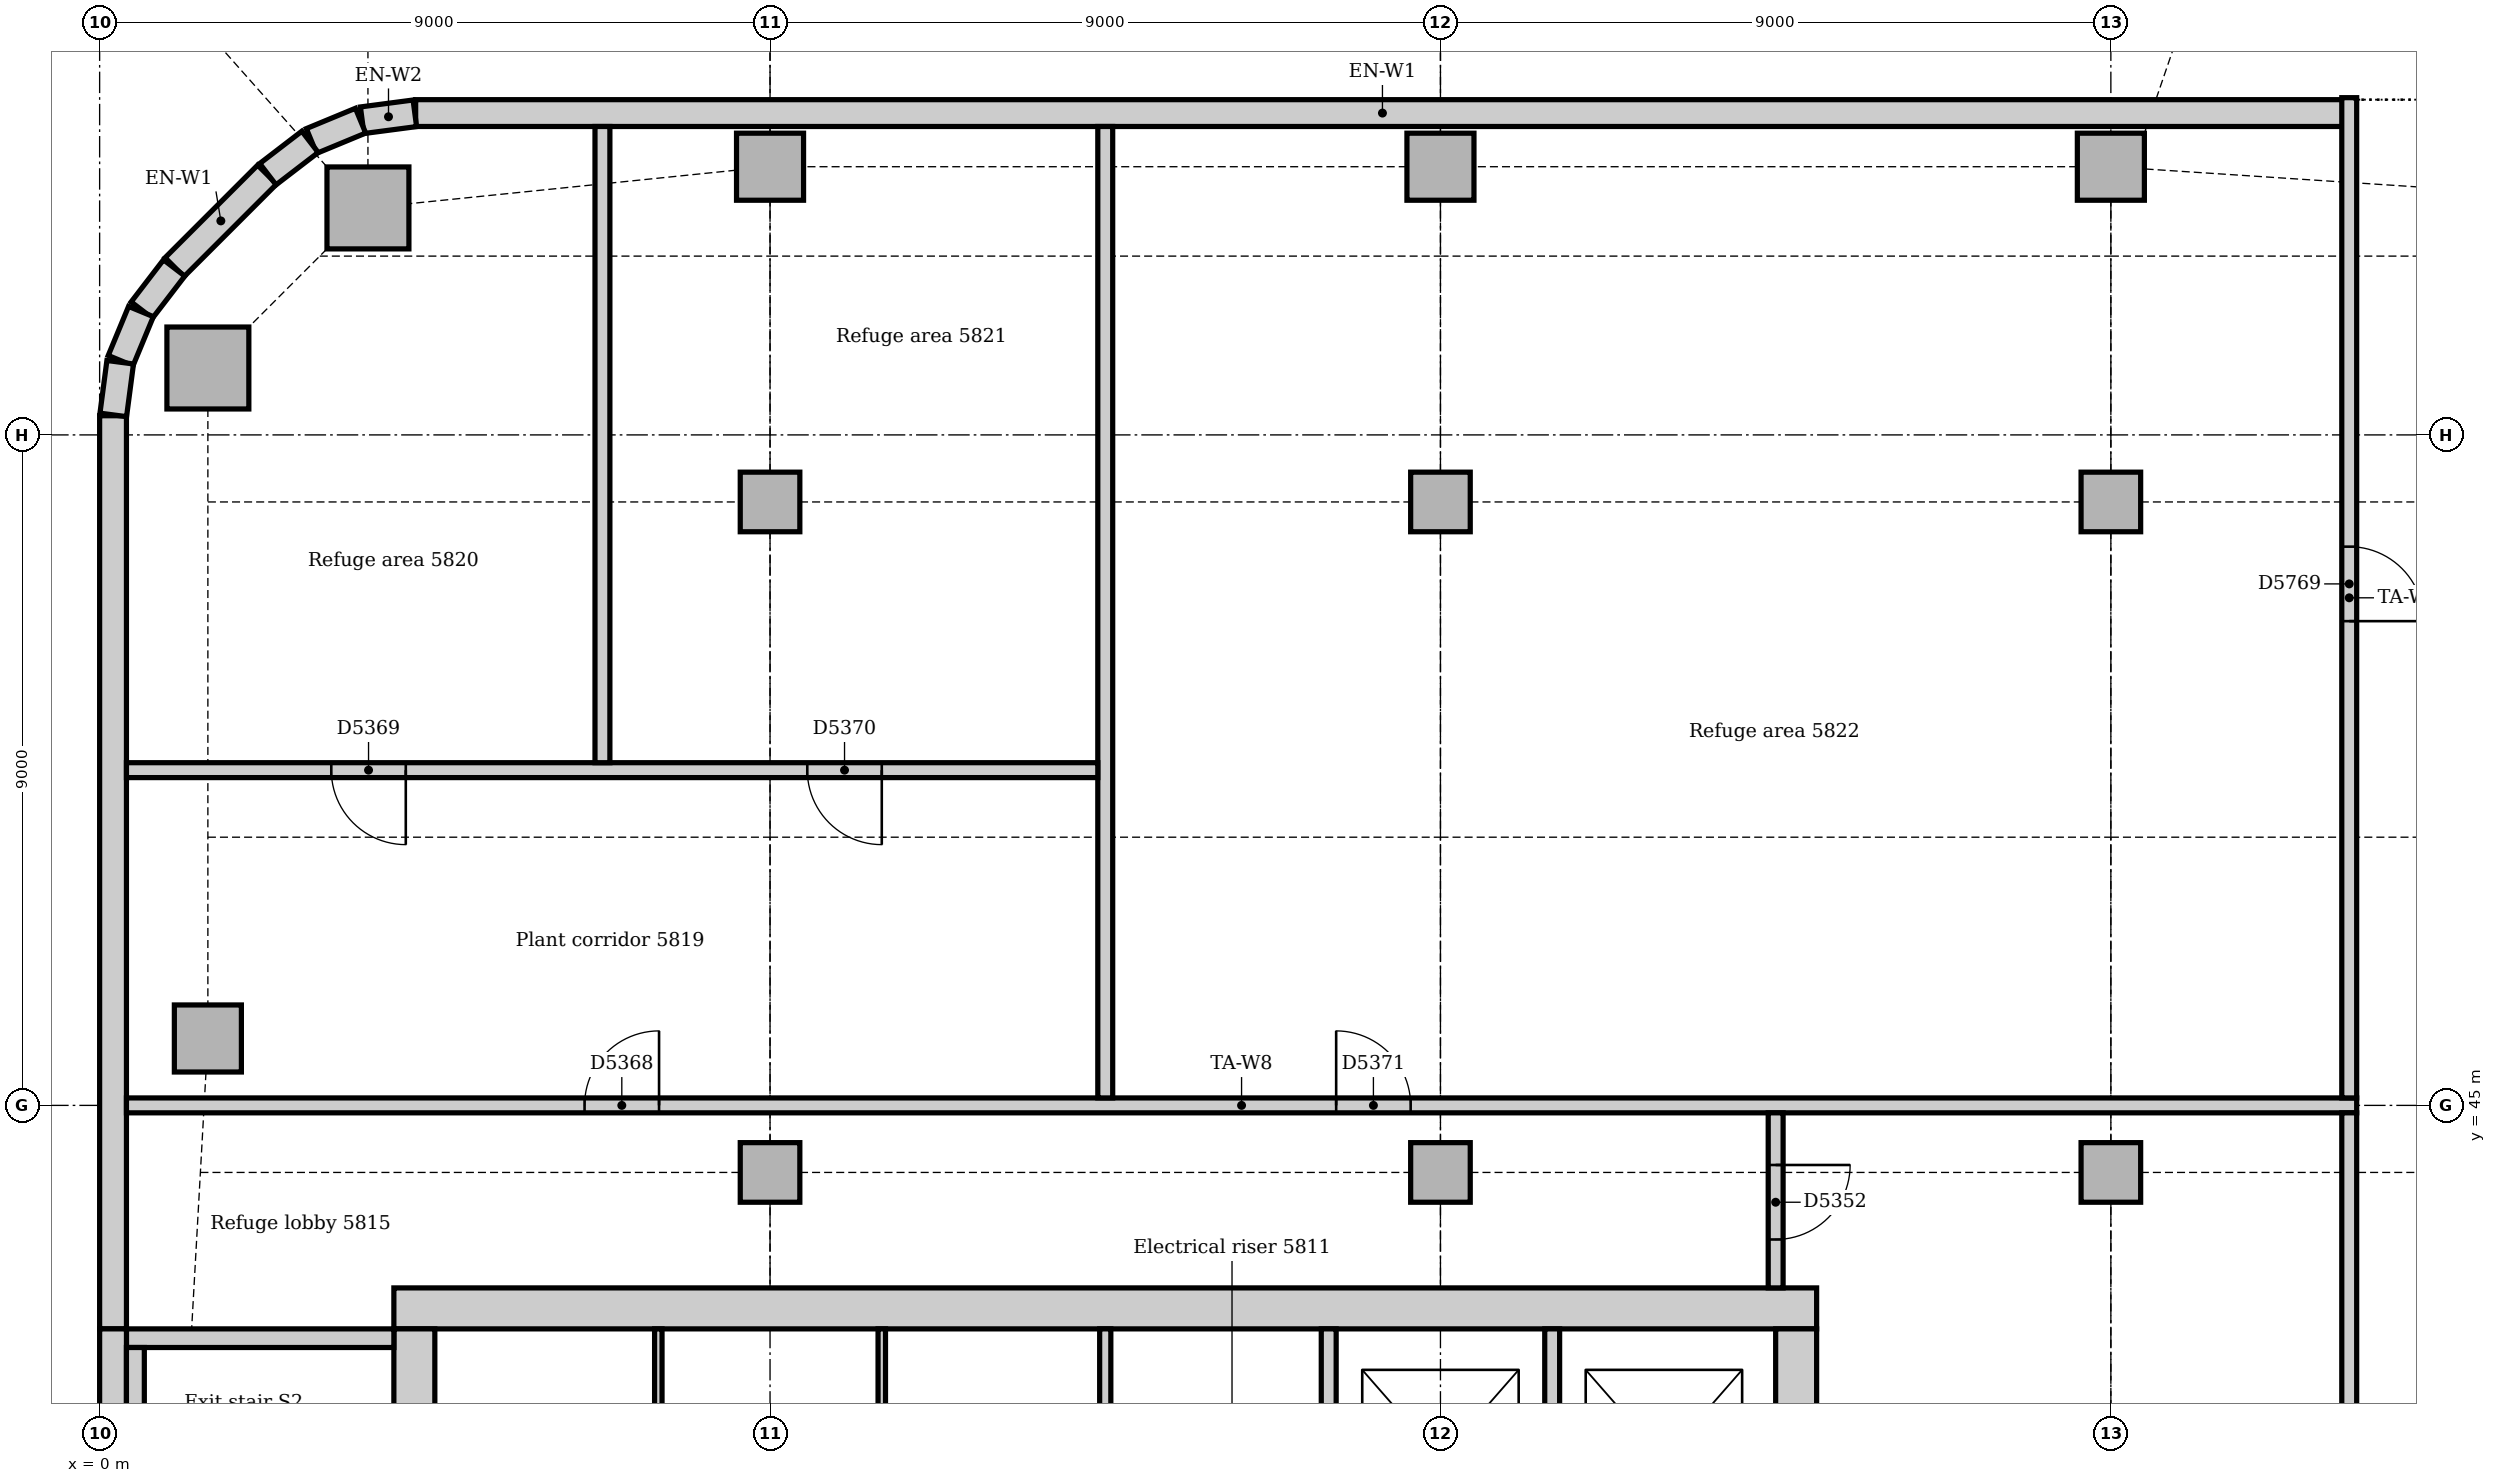
"""IFC4 building model, lengths in metres.
Left out: names, types, materials, properties, quantities, classifications, styles, units other than length and angle.
Written with IfcOpenShell. Run it as: python <this file> out.ifc"""

import sys

from ifc_helpers import new_model, si_unit, direction, frame, frame_2d, origin, origin_2d, place, context, subcontext, project, spatial, rectangle, extrude, element, fill, save


model = new_model("IFC4")
c1 = context("Model", 3, precision=1e-05, world=origin(), true_north=direction((0.0, 1.0)))
c2 = subcontext(c1, "Body", "Model", "MODEL_VIEW")
j1 = project(units=[si_unit("LENGTHUNIT", "METRE"), si_unit("PLANEANGLEUNIT", "RADIAN")], contexts=[c1])
p1 = place(None, origin())
s1 = spatial("IfcSite", under=j1, at=p1, CompositionType="ELEMENT")
p2 = place(p1, origin())
s2 = spatial("IfcBuilding", under=s1, at=p2, CompositionType="ELEMENT")
p3 = place(p2, frame((0.0, 0.0, 242.0)))
s3 = spatial("IfcBuildingStorey", under=s2, at=p3, CompositionType="ELEMENT", Elevation=242.0)
p4 = place(p3, frame((23.05, 42.275, 0.0), z_axis=(0.0, 0.0, 1.0), x_axis=(-1.0, 0.0, 0.0)))
e1 = element("IfcWall", 1, at=p4, inside=s3, PredefinedType="SOLIDWALL", context=c2, shape_type="SweptSolid", body=[
    extrude(rectangle(XDim=19.1, YDim=0.55, at=frame_2d((9.55, 0.0))), origin(), (0.0, 0.0, 1.0), 5.0),
])
p5 = place(p3, frame((22.775, 31.5, 0.0), z_axis=(0.0, 0.0, 1.0), x_axis=(0.0, 1.0, 0.0)))
e2 = element("IfcWall", 2, at=p5, inside=s3, PredefinedType="SOLIDWALL", context=c2, shape_type="SweptSolid", body=[
    extrude(rectangle(XDim=10.5, YDim=0.55, at=frame_2d((5.25, 0.0))), origin(), (0.0, 0.0, 1.0), 5.0),
])
p6 = place(p5, frame((3.15, 0.0, 0.0)))
e3 = element("IfcOpeningElement", 3, at=p6, cuts=e2, PredefinedType="OPENING", context=c2, shape_type="SweptSolid", body=[
    extrude(rectangle(XDim=1.0, YDim=2.1, at=frame_2d((0.5, 1.05))), frame((0.0, 0.285, 0.0), z_axis=(0.0, -1.0, 0.0), x_axis=(1.0, 0.0, 0.0)), (0.0, 0.0, 1.0), 0.57),
])
p7 = place(p5, frame((5.2, 0.0, 0.0)))
e4 = element("IfcOpeningElement", 4, at=p7, cuts=e2, PredefinedType="OPENING", context=c2, shape_type="SweptSolid", body=[
    extrude(rectangle(XDim=1.0, YDim=2.1, at=frame_2d((0.5, 1.05))), frame((0.0, 0.285, 0.0), z_axis=(0.0, -1.0, 0.0), x_axis=(1.0, 0.0, 0.0)), (0.0, 0.0, 1.0), 0.57),
])
p8 = place(p3, frame((4.225, 42.0, 0.0), z_axis=(0.0, 0.0, 1.0), x_axis=(0.0, -1.0, 0.0)))
e5 = element("IfcWall", 5, at=p8, inside=s3, PredefinedType="SOLIDWALL", context=c2, shape_type="SweptSolid", body=[
    extrude(rectangle(XDim=10.5, YDim=0.55, at=frame_2d((5.25, 0.0))), origin(), (0.0, 0.0, 1.0), 5.0),
])
p9 = place(p8, frame((5.3, 0.0, 0.0)))
e6 = element("IfcOpeningElement", 6, at=p9, cuts=e5, PredefinedType="OPENING", context=c2, shape_type="SweptSolid", body=[
    extrude(rectangle(XDim=1.0, YDim=2.1, at=frame_2d((0.5, 1.05))), frame((0.0, 0.285, 0.0), z_axis=(0.0, -1.0, 0.0), x_axis=(1.0, 0.0, 0.0)), (0.0, 0.0, 1.0), 0.57),
])
p10 = place(p3, frame((3.95, 41.875, 0.0), z_axis=(0.0, 0.0, 1.0), x_axis=(-1.0, 0.0, 0.0)))
e7 = element("IfcWall", 7, at=p10, inside=s3, PredefinedType="SOLIDWALL", context=c2, shape_type="SweptSolid", body=[
    extrude(rectangle(XDim=3.59, YDim=0.25, at=frame_2d((1.795, 0.0))), origin(), (0.0, 0.0, 1.0), 5.0),
])
for number, where, z_axis, x_axis in (
    (8, (3.602, 57.047, 0.0), (0.0, 0.0, 1.0), (1.0, 0.0, 0.0)),
    (9, (1.453, 54.898, 0.0), (0.0, 0.0, 1.0), (1.0, 0.0, 0.0)),
):
    element("IfcColumn", number, at=place(p3, frame(where, z_axis=z_axis, x_axis=x_axis)), inside=s3, PredefinedType="COLUMN", context=c2, shape_type="SweptSolid", body=[
        extrude(rectangle(XDim=1.1, YDim=1.1, at=origin_2d()), origin(), (0.0, 0.0, 1.0), 4.85),
    ])
for number, where, z_axis, x_axis in (
    (10, (9.0, 57.6, 0.0), (0.0, 0.0, 1.0), (1.0, 0.0, 0.0)),
    (11, (18.0, 57.6, 0.0), (0.0, 0.0, 1.0), (1.0, 0.0, 0.0)),
    (12, (27.0, 57.6, 0.0), (0.0, 0.0, 1.0), (1.0, 0.0, 0.0)),
    (13, (1.453, 45.898, 0.0), (0.0, 0.0, 1.0), (1.0, 0.0, 0.0)),
):
    element("IfcColumn", number, at=place(p3, frame(where, z_axis=z_axis, x_axis=x_axis)), inside=s3, PredefinedType="COLUMN", context=c2, shape_type="SweptSolid", body=[
        extrude(rectangle(XDim=0.9, YDim=0.9, at=origin_2d()), origin(), (0.0, 0.0, 1.0), 4.85),
    ])
for number, where, z_axis, x_axis in (
    (14, (9.0, 44.1, 0.0), (0.0, 0.0, 1.0), (1.0, 0.0, 0.0)),
    (15, (9.0, 53.1, 0.0), (0.0, 0.0, 1.0), (1.0, 0.0, 0.0)),
    (16, (18.0, 44.1, 0.0), (0.0, 0.0, 1.0), (1.0, 0.0, 0.0)),
    (17, (18.0, 53.1, 0.0), (0.0, 0.0, 1.0), (1.0, 0.0, 0.0)),
    (18, (27.0, 44.1, 0.0), (0.0, 0.0, 1.0), (1.0, 0.0, 0.0)),
    (19, (27.0, 53.1, 0.0), (0.0, 0.0, 1.0), (1.0, 0.0, 0.0)),
):
    element("IfcColumn", number, at=place(p3, frame(where, z_axis=z_axis, x_axis=x_axis)), inside=s3, PredefinedType="COLUMN", context=c2, shape_type="SweptSolid", body=[
        extrude(rectangle(XDim=0.8, YDim=0.8, at=origin_2d()), origin(), (0.0, 0.0, 1.0), 4.85),
    ])
p11 = place(p3, frame((30.2, 58.32, 0.0), z_axis=(0.0, 0.0, 1.0), x_axis=(-1.0, 0.0, 0.0)))
e20 = element("IfcWall", 20, at=p11, inside=s3, PredefinedType="STANDARD", context=c2, shape_type="SweptSolid", body=[
    extrude(rectangle(XDim=25.957, YDim=0.36, at=frame_2d((12.979, 0.0))), origin(), (0.0, 0.0, 1.0), 3.25),
])
p12 = place(p3, frame((2.249, 57.494, 0.0), z_axis=(0.0, 0.0, 1.0), x_axis=(-0.707106781187, -0.707106781187, 0.0)))
e21 = element("IfcWall", 21, at=p12, inside=s3, PredefinedType="STANDARD", context=c2, shape_type="SweptSolid", body=[
    extrude(rectangle(XDim=1.757, YDim=0.36, at=frame_2d((0.879, 0.0))), origin(), (0.0, 0.0, 1.0), 3.25),
])
p13 = place(p3, frame((0.18, 54.257, 0.0), z_axis=(0.0, 0.0, 1.0), x_axis=(0.0, -1.0, 0.0)))
e22 = element("IfcWall", 22, at=p13, inside=s3, PredefinedType="STANDARD", context=c2, shape_type="SweptSolid", body=[
    extrude(rectangle(XDim=12.257, YDim=0.36, at=frame_2d((6.129, 0.0))), origin(), (0.0, 0.0, 1.0), 4.85),
])
p14 = place(p3, frame((0.18, 42.0, 0.0), z_axis=(0.0, 0.0, 1.0), x_axis=(0.0, -1.0, 0.0)))
e23 = element("IfcWall", 23, at=p14, inside=s3, PredefinedType="STANDARD", context=c2, shape_type="SweptSolid", body=[
    extrude(rectangle(XDim=6.75, YDim=0.36, at=frame_2d((3.375, 0.0))), origin(), (0.0, 0.0, 1.0), 4.85),
])
for number, where, z_axis, x_axis in (
    (24, (4.231, 58.317, 0.0), (0.0, 0.0, 1.0), (-0.991, -0.131, 0.0)),
    (25, (3.503, 58.218, 0.0), (0.0, 0.0, 1.0), (-0.924, -0.383, 0.0)),
):
    element("IfcWall", number, at=place(p3, frame(where, z_axis=z_axis, x_axis=x_axis)), inside=s3, PredefinedType="STANDARD", context=c2, shape_type="SweptSolid", body=[
        extrude(rectangle(XDim=0.713, YDim=0.36, at=frame_2d((0.356, 0.0))), origin(), (0.0, 0.0, 1.0), 3.25),
    ])
for number, where, z_axis, x_axis in (
    (26, (2.825, 57.934, 0.0), (0.0, 0.0, 1.0), (-0.793, -0.609, 0.0)),
    (27, (1.0, 56.241, 0.0), (0.0, 0.0, 1.0), (-0.609, -0.793, 0.0)),
):
    element("IfcWall", number, at=place(p3, frame(where, z_axis=z_axis, x_axis=x_axis)), inside=s3, PredefinedType="STANDARD", context=c2, shape_type="SweptSolid", body=[
        extrude(rectangle(XDim=0.713, YDim=0.36, at=frame_2d((0.357, 0.0))), origin(), (0.0, 0.0, 1.0), 3.25),
    ])
for number, where, z_axis, x_axis in (
    (28, (0.555, 55.656, 0.0), (0.0, 0.0, 1.0), (-0.383, -0.924, 0.0)),
    (29, (0.276, 54.976, 0.0), (0.0, 0.0, 1.0), (-0.131, -0.991, 0.0)),
):
    element("IfcWall", number, at=place(p3, frame(where, z_axis=z_axis, x_axis=x_axis)), inside=s3, PredefinedType="STANDARD", context=c2, shape_type="SweptSolid", body=[
        extrude(rectangle(XDim=0.713, YDim=0.36, at=frame_2d((0.356, 0.0))), origin(), (0.0, 0.0, 1.0), 3.25),
    ])
p15 = place(p3, frame((0.48, 39.795, 0.0), z_axis=(0.0, 0.0, 1.0), x_axis=(0.0, 1.0, 0.0)))
e30 = element("IfcWall", 30, at=p15, inside=s3, PredefinedType="STANDARD", context=c2, shape_type="SweptSolid", body=[
    extrude(rectangle(XDim=1.955, YDim=0.24, at=frame_2d((0.978, 0.0))), origin(), (0.0, 0.0, 1.0), 5.0),
])
p16 = place(p3, frame((0.36, 45.0, 0.0), z_axis=(0.0, 0.0, 1.0), x_axis=(1.0, 0.0, 0.0)))
e31 = element("IfcWall", 31, at=p16, inside=s3, PredefinedType="PARTITIONING", context=c2, shape_type="SweptSolid", body=[
    extrude(rectangle(XDim=29.94, YDim=0.2, at=frame_2d((14.97, 0.0))), origin(), (0.0, 0.0, 1.0), 4.85),
])
p17 = place(p16, frame((6.15, 0.0, 0.0)))
e32 = element("IfcOpeningElement", 32, at=p17, cuts=e31, PredefinedType="OPENING", context=c2, shape_type="SweptSolid", body=[
    extrude(rectangle(XDim=1.0, YDim=2.1, at=frame_2d((0.5, 1.05))), frame((0.0, 0.11, 0.0), z_axis=(0.0, -1.0, 0.0), x_axis=(1.0, 0.0, 0.0)), (0.0, 0.0, 1.0), 0.22),
])
p18 = place(p16, frame((16.24, 0.0, 0.0)))
e33 = element("IfcOpeningElement", 33, at=p18, cuts=e31, PredefinedType="OPENING", context=c2, shape_type="SweptSolid", body=[
    extrude(rectangle(XDim=1.0, YDim=2.1, at=frame_2d((0.5, 1.05))), frame((0.0, 0.11, 0.0), z_axis=(0.0, -1.0, 0.0), x_axis=(1.0, 0.0, 0.0)), (0.0, 0.0, 1.0), 0.22),
])
p19 = place(p3, frame((30.2, 45.1, 0.0), z_axis=(0.0, 0.0, 1.0), x_axis=(0.0, 1.0, 0.0)))
e34 = element("IfcWall", 34, at=p19, inside=s3, PredefinedType="PARTITIONING", context=c2, shape_type="SweptSolid", body=[
    extrude(rectangle(XDim=13.427, YDim=0.2, at=frame_2d((6.713, 0.0))), origin(), (0.0, 0.0, 1.0), 4.85),
])
p20 = place(p19, frame((6.4, 0.0, 0.0)))
e35 = element("IfcOpeningElement", 35, at=p20, cuts=e34, PredefinedType="OPENING", context=c2, shape_type="SweptSolid", body=[
    extrude(rectangle(XDim=1.0, YDim=2.1, at=frame_2d((0.5, 1.05))), frame((0.0, 0.11, 0.0), z_axis=(0.0, -1.0, 0.0), x_axis=(1.0, 0.0, 0.0)), (0.0, 0.0, 1.0), 0.22),
])
p21 = place(p3, frame((30.2, 33.75, 0.0), z_axis=(0.0, 0.0, 1.0), x_axis=(0.0, 1.0, 0.0)))
e36 = element("IfcWall", 36, at=p21, inside=s3, PredefinedType="PARTITIONING", context=c2, shape_type="SweptSolid", body=[
    extrude(rectangle(XDim=11.15, YDim=0.2, at=frame_2d((5.575, 0.0))), origin(), (0.0, 0.0, 1.0), 4.85),
])
p22 = place(p3, frame((13.5, 45.1, 0.0), z_axis=(0.0, 0.0, 1.0), x_axis=(0.0, 1.0, 0.0)))
e37 = element("IfcWall", 37, at=p22, inside=s3, PredefinedType="PARTITIONING", context=c2, shape_type="SweptSolid", body=[
    extrude(rectangle(XDim=13.04, YDim=0.2, at=frame_2d((6.52, 0.0))), origin(), (0.0, 0.0, 1.0), 4.85),
])
p23 = place(p3, frame((0.36, 49.5, 0.0), z_axis=(0.0, 0.0, 1.0), x_axis=(1.0, 0.0, 0.0)))
e38 = element("IfcWall", 38, at=p23, inside=s3, PredefinedType="PARTITIONING", context=c2, shape_type="SweptSolid", body=[
    extrude(rectangle(XDim=13.04, YDim=0.2, at=frame_2d((6.52, 0.0))), origin(), (0.0, 0.0, 1.0), 4.85),
])
p24 = place(p23, frame((2.75, 0.0, 0.0)))
e39 = element("IfcOpeningElement", 39, at=p24, cuts=e38, PredefinedType="OPENING", context=c2, shape_type="SweptSolid", body=[
    extrude(rectangle(XDim=1.0, YDim=2.1, at=frame_2d((0.5, 1.05))), frame((0.0, 0.11, 0.0), z_axis=(0.0, -1.0, 0.0), x_axis=(1.0, 0.0, 0.0)), (0.0, 0.0, 1.0), 0.22),
])
p25 = place(p23, frame((9.14, 0.0, 0.0)))
e40 = element("IfcOpeningElement", 40, at=p25, cuts=e38, PredefinedType="OPENING", context=c2, shape_type="SweptSolid", body=[
    extrude(rectangle(XDim=1.0, YDim=2.1, at=frame_2d((0.5, 1.05))), frame((0.0, 0.11, 0.0), z_axis=(0.0, -1.0, 0.0), x_axis=(1.0, 0.0, 0.0)), (0.0, 0.0, 1.0), 0.22),
])
p26 = place(p3, frame((6.75, 49.6, 0.0), z_axis=(0.0, 0.0, 1.0), x_axis=(0.0, 1.0, 0.0)))
e41 = element("IfcWall", 41, at=p26, inside=s3, PredefinedType="PARTITIONING", context=c2, shape_type="SweptSolid", body=[
    extrude(rectangle(XDim=8.54, YDim=0.2, at=frame_2d((4.27, 0.0))), origin(), (0.0, 0.0, 1.0), 4.85),
])
p27 = place(p3, frame((22.5, 42.55, 0.0), z_axis=(0.0, 0.0, 1.0), x_axis=(0.0, 1.0, 0.0)))
e42 = element("IfcWall", 42, at=p27, inside=s3, PredefinedType="PARTITIONING", context=c2, shape_type="SweptSolid", body=[
    extrude(rectangle(XDim=2.35, YDim=0.2, at=frame_2d((1.175, 0.0))), origin(), (0.0, 0.0, 1.0), 4.85),
])
p28 = place(p27, frame((0.65, 0.0, 0.0)))
e43 = element("IfcOpeningElement", 43, at=p28, cuts=e42, PredefinedType="OPENING", context=c2, shape_type="SweptSolid", body=[
    extrude(rectangle(XDim=1.0, YDim=2.1, at=frame_2d((0.5, 1.05))), frame((0.0, 0.11, 0.0), z_axis=(0.0, -1.0, 0.0), x_axis=(1.0, 0.0, 0.0)), (0.0, 0.0, 1.0), 0.22),
])
for number, where, z_axis, x_axis in (
    (44, (16.5, 38.6, 0.0), (0.0, 0.0, 1.0), (0.0, 1.0, 0.0)),
    (45, (19.5, 38.6, 0.0), (0.0, 0.0, 1.0), (0.0, 1.0, 0.0)),
):
    element("IfcWall", number, at=place(p3, frame(where, z_axis=z_axis, x_axis=x_axis)), inside=s3, PredefinedType="PARTITIONING", context=c2, shape_type="SweptSolid", body=[
        extrude(rectangle(XDim=3.4, YDim=0.2, at=frame_2d((1.7, 0.0))), origin(), (0.0, 0.0, 1.0), 4.85),
    ])
p29 = place(p3, frame((13.5, 38.575, 0.0), z_axis=(0.0, 0.0, 1.0), x_axis=(0.0, 1.0, 0.0)))
e46 = element("IfcWall", 46, at=p29, inside=s3, PredefinedType="PARTITIONING", context=c2, shape_type="SweptSolid", body=[
    extrude(rectangle(XDim=3.425, YDim=0.15, at=frame_2d((1.712, 0.0))), origin(), (0.0, 0.0, 1.0), 4.85),
])
for number, where, z_axis, x_axis in (
    (47, (7.5, 38.575, 0.0), (0.0, 0.0, 1.0), (0.0, 1.0, 0.0)),
    (48, (10.5, 38.575, 0.0), (0.0, 0.0, 1.0), (0.0, 1.0, 0.0)),
):
    element("IfcWall", number, at=place(p3, frame(where, z_axis=z_axis, x_axis=x_axis)), inside=s3, PredefinedType="PARTITIONING", context=c2, shape_type="SweptSolid", body=[
        extrude(rectangle(XDim=3.425, YDim=0.1, at=frame_2d((1.712, 0.0))), origin(), (0.0, 0.0, 1.0), 4.85),
    ])
p30 = place(p28, frame((1.0, 0.0, 0.0), z_axis=(0.0, 0.0, 1.0), x_axis=(-1.0, 0.0, 0.0)))
e49 = element("IfcDoor", 49, at=p30, inside=s3, OperationType="SINGLE_SWING_LEFT", PredefinedType="DOOR", context=c2, shape_type="SweptSolid", body=[
    extrude(rectangle(XDim=1.0, YDim=2.1, at=frame_2d((0.5, 1.05))), frame((0.0, 0.025, 0.0), z_axis=(0.0, -1.0, 0.0), x_axis=(1.0, 0.0, 0.0)), (0.0, 0.0, 1.0), 0.05),
])
fill(e43, e49)
p31 = place(p17, origin())
e50 = element("IfcDoor", 50, at=p31, inside=s3, OperationType="SINGLE_SWING_RIGHT", PredefinedType="DOOR", context=c2, shape_type="SweptSolid", body=[
    extrude(rectangle(XDim=1.0, YDim=2.1, at=frame_2d((0.5, 1.05))), frame((0.0, 0.025, 0.0), z_axis=(0.0, -1.0, 0.0), x_axis=(1.0, 0.0, 0.0)), (0.0, 0.0, 1.0), 0.05),
])
fill(e32, e50)
p32 = place(p24, frame((1.0, 0.0, 0.0), z_axis=(0.0, 0.0, 1.0), x_axis=(-1.0, 0.0, 0.0)))
e51 = element("IfcDoor", 51, at=p32, inside=s3, OperationType="SINGLE_SWING_LEFT", PredefinedType="DOOR", context=c2, shape_type="SweptSolid", body=[
    extrude(rectangle(XDim=1.0, YDim=2.1, at=frame_2d((0.5, 1.05))), frame((0.0, 0.025, 0.0), z_axis=(0.0, -1.0, 0.0), x_axis=(1.0, 0.0, 0.0)), (0.0, 0.0, 1.0), 0.05),
])
fill(e39, e51)
p33 = place(p25, frame((1.0, 0.0, 0.0), z_axis=(0.0, 0.0, 1.0), x_axis=(-1.0, 0.0, 0.0)))
e52 = element("IfcDoor", 52, at=p33, inside=s3, OperationType="SINGLE_SWING_LEFT", PredefinedType="DOOR", context=c2, shape_type="SweptSolid", body=[
    extrude(rectangle(XDim=1.0, YDim=2.1, at=frame_2d((0.5, 1.05))), frame((0.0, 0.025, 0.0), z_axis=(0.0, -1.0, 0.0), x_axis=(1.0, 0.0, 0.0)), (0.0, 0.0, 1.0), 0.05),
])
fill(e40, e52)
p34 = place(p18, origin())
e53 = element("IfcDoor", 53, at=p34, inside=s3, OperationType="SINGLE_SWING_LEFT", PredefinedType="DOOR", context=c2, shape_type="SweptSolid", body=[
    extrude(rectangle(XDim=1.0, YDim=2.1, at=frame_2d((0.5, 1.05))), frame((0.0, 0.025, 0.0), z_axis=(0.0, -1.0, 0.0), x_axis=(1.0, 0.0, 0.0)), (0.0, 0.0, 1.0), 0.05),
])
fill(e33, e53)
p35 = place(p20, frame((1.0, 0.0, 0.0), z_axis=(0.0, 0.0, 1.0), x_axis=(-1.0, 0.0, 0.0)))
e54 = element("IfcDoor", 54, at=p35, inside=s3, OperationType="SINGLE_SWING_RIGHT", PredefinedType="DOOR", context=c2, shape_type="SweptSolid", body=[
    extrude(rectangle(XDim=1.0, YDim=2.1, at=frame_2d((0.5, 1.05))), frame((0.0, 0.025, 0.0), z_axis=(0.0, -1.0, 0.0), x_axis=(1.0, 0.0, 0.0)), (0.0, 0.0, 1.0), 0.05),
])
fill(e35, e54)
save(model, sys.argv[1])
